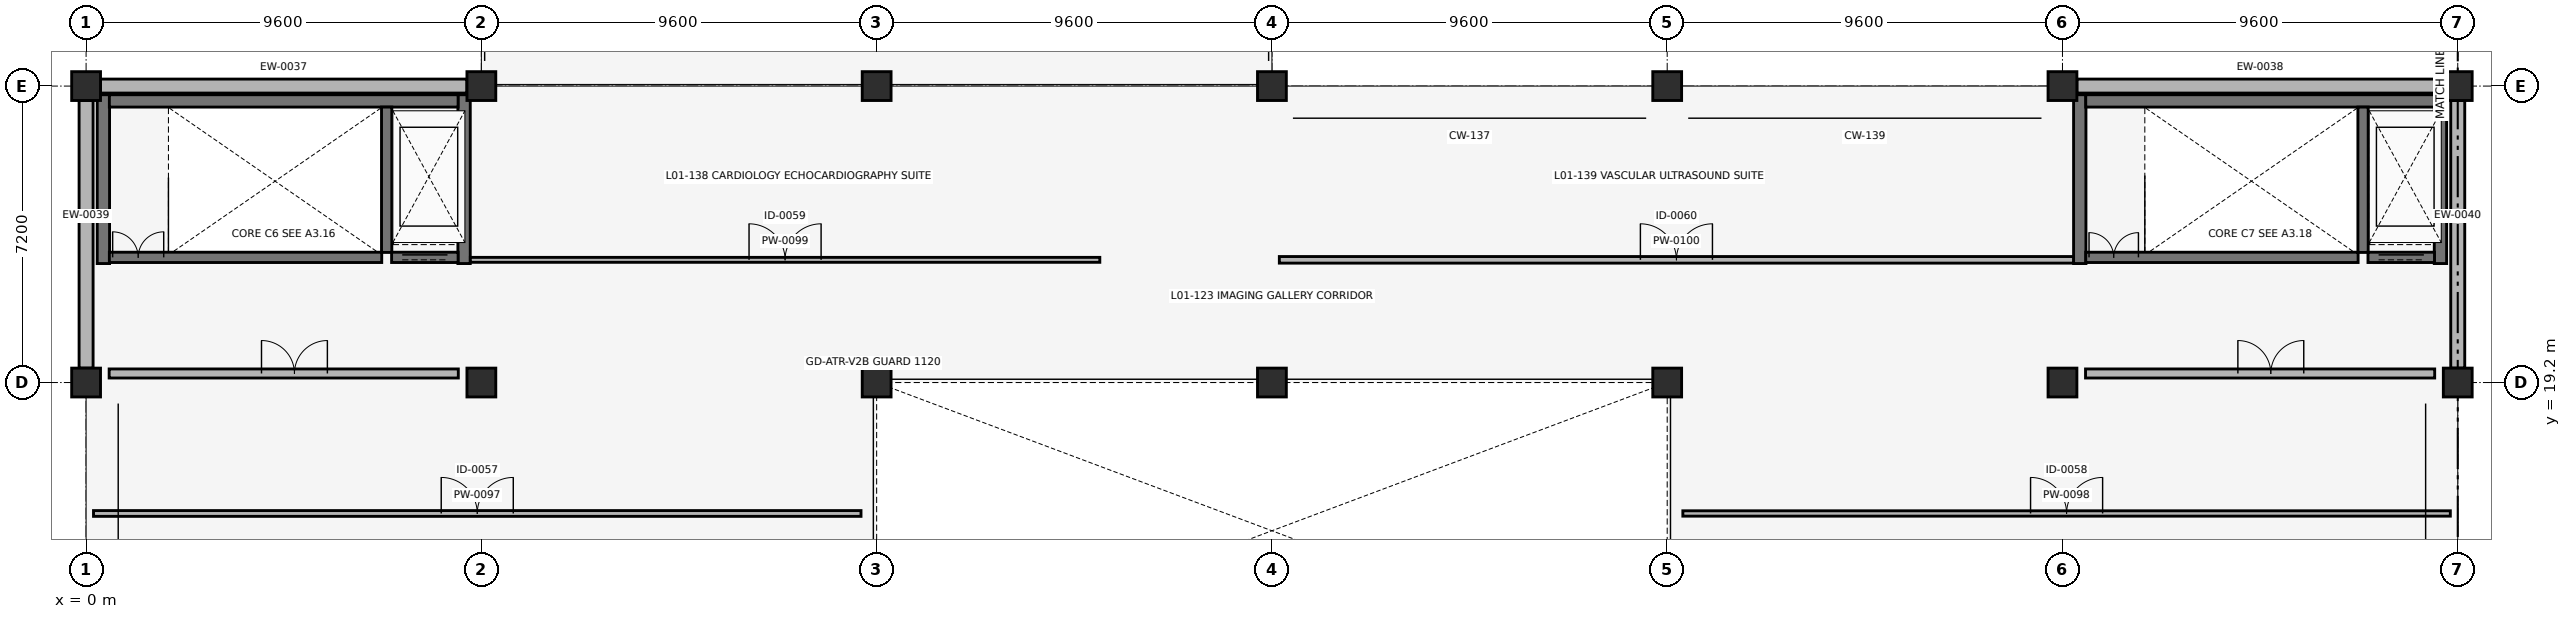
"""IFC4 building model, lengths in metres.
Left out: names, types, materials, properties, quantities, classifications, styles, units other than length and angle.
Written with IfcOpenShell. Run it as: python <this file> out.ifc"""

import sys

from ifc_helpers import new_model, si_unit, direction, frame, frame_2d, origin, origin_2d, place, context, subcontext, project, spatial, rectangle, circle, extrude, element, fill, save


model = new_model("IFC4")
c1 = context("Model", 3, precision=1e-05, world=origin(), true_north=direction((0.0, 1.0)))
c2 = subcontext(c1, "Body", "Model", "MODEL_VIEW")
j1 = project(units=[si_unit("LENGTHUNIT", "METRE"), si_unit("PLANEANGLEUNIT", "RADIAN")], contexts=[c1])
p1 = place(None, origin())
s1 = spatial("IfcSite", under=j1, at=p1, CompositionType="ELEMENT")
p2 = place(p1, origin())
s2 = spatial("IfcBuilding", under=s1, at=p2, CompositionType="ELEMENT")
p3 = place(p2, frame((0.0, 0.0, 4.42)))
s3 = spatial("IfcBuildingStorey", under=s2, at=p3, CompositionType="ELEMENT", Elevation=4.42)
for number, where, z_axis, x_axis in (
    (1, (0.0, 19.2, 0.0), (0.0, 0.0, 1.0), (1.0, 0.0, 0.0)),
    (2, (0.0, 26.4, 0.0), (0.0, 0.0, 1.0), (1.0, 0.0, 0.0)),
    (3, (9.6, 19.2, 0.0), (0.0, 0.0, 1.0), (1.0, 0.0, 0.0)),
    (4, (9.6, 26.4, 0.0), (0.0, 0.0, 1.0), (1.0, 0.0, 0.0)),
    (5, (19.2, 19.2, 0.0), (0.0, 0.0, 1.0), (1.0, 0.0, 0.0)),
    (6, (19.2, 26.4, 0.0), (0.0, 0.0, 1.0), (1.0, 0.0, 0.0)),
    (7, (28.8, 19.2, 0.0), (0.0, 0.0, 1.0), (1.0, 0.0, 0.0)),
    (8, (28.8, 26.4, 0.0), (0.0, 0.0, 1.0), (1.0, 0.0, 0.0)),
    (9, (38.4, 19.2, 0.0), (0.0, 0.0, 1.0), (1.0, 0.0, 0.0)),
    (10, (38.4, 26.4, 0.0), (0.0, 0.0, 1.0), (1.0, 0.0, 0.0)),
    (11, (48.0, 19.2, 0.0), (0.0, 0.0, 1.0), (1.0, 0.0, 0.0)),
    (12, (48.0, 26.4, 0.0), (0.0, 0.0, 1.0), (1.0, 0.0, 0.0)),
    (13, (57.6, 19.2, 0.0), (0.0, 0.0, 1.0), (1.0, 0.0, 0.0)),
    (14, (57.6, 26.4, 0.0), (0.0, 0.0, 1.0), (1.0, 0.0, 0.0)),
):
    element("IfcColumn", number, at=place(p3, frame(where, z_axis=z_axis, x_axis=x_axis)), inside=s3, PredefinedType="COLUMN", context=c2, shape_type="SweptSolid", body=[
        extrude(circle(Radius=0.35, at=origin_2d()), origin(), (0.0, 0.0, 1.0), 4.08),
    ])
for number, where, z_axis, x_axis in (
    (15, (9.25, 26.4, 0.0), (0.0, 0.0, 1.0), (-1.0, 0.0, 0.0)),
    (16, (57.25, 26.4, 0.0), (0.0, 0.0, 1.0), (-1.0, 0.0, 0.0)),
):
    element("IfcWall", number, at=place(p3, frame(where, z_axis=z_axis, x_axis=x_axis)), inside=s3, PredefinedType="SOLIDWALL", context=c2, shape_type="SweptSolid", body=[
        extrude(rectangle(XDim=8.9, YDim=0.34, at=frame_2d((4.45, 0.0))), origin(), (0.0, 0.0, 1.0), 3.01),
    ])
for number, where, z_axis, x_axis in (
    (17, (0.0, 26.05, 0.0), (0.0, 0.0, 1.0), (0.0, -1.0, 0.0)),
    (18, (57.6, 19.55, 0.0), (0.0, 0.0, 1.0), (0.0, 1.0, 0.0)),
):
    element("IfcWall", number, at=place(p3, frame(where, z_axis=z_axis, x_axis=x_axis)), inside=s3, PredefinedType="SOLIDWALL", context=c2, shape_type="SweptSolid", body=[
        extrude(rectangle(XDim=6.5, YDim=0.34, at=frame_2d((3.25, 0.0))), origin(), (0.0, 0.0, 1.0), 3.01),
    ])
for number, where, z_axis, x_axis in (
    (19, (0.42, 22.09, 0.0), (0.0, 0.0, 1.0), (0.0, 1.0, 0.0)),
    (20, (9.18, 22.09, 0.0), (0.0, 0.0, 1.0), (0.0, 1.0, 0.0)),
):
    element("IfcWall", number, at=place(p3, frame(where, z_axis=z_axis, x_axis=x_axis)), inside=s3, PredefinedType="SHEAR", context=c2, shape_type="SweptSolid", body=[
        extrude(rectangle(XDim=4.1, YDim=0.3, at=frame_2d((2.05, 0.0))), origin(), (0.0, 0.0, 1.0), 3.74),
    ])
p4 = place(p3, frame((0.565, 26.04, 0.0), z_axis=(0.0, 0.0, 1.0), x_axis=(1.0, 0.0, 0.0)))
e21 = element("IfcWall", 21, at=p4, inside=s3, PredefinedType="SHEAR", context=c2, shape_type="SweptSolid", body=[
    extrude(rectangle(XDim=8.47, YDim=0.3, at=frame_2d((4.235, 0.0))), origin(), (0.0, 0.0, 1.0), 3.74),
])
p5 = place(p3, frame((7.3, 22.36, 0.0), z_axis=(0.0, 0.0, 1.0), x_axis=(0.0, 1.0, 0.0)))
e22 = element("IfcWall", 22, at=p5, inside=s3, PredefinedType="SHEAR", context=c2, shape_type="SweptSolid", body=[
    extrude(rectangle(XDim=3.53, YDim=0.25, at=frame_2d((1.765, 0.0))), origin(), (0.0, 0.0, 1.0), 3.74),
])
p6 = place(p3, frame((0.565, 22.24, 0.0), z_axis=(0.0, 0.0, 1.0), x_axis=(1.0, 0.0, 0.0)))
e23 = element("IfcWall", 23, at=p6, inside=s3, PredefinedType="SHEAR", context=c2, shape_type="SweptSolid", body=[
    extrude(rectangle(XDim=6.615, YDim=0.25, at=frame_2d((3.308, 0.0))), origin(), (0.0, 0.0, 1.0), 3.74),
])
p7 = place(p6, frame((0.08, 0.0, 0.0)))
e24 = element("IfcOpeningElement", 24, at=p7, cuts=e23, PredefinedType="OPENING", context=c2, shape_type="SweptSolid", body=[
    extrude(rectangle(XDim=1.24, YDim=2.15, at=frame_2d((0.62, 1.075))), frame((0.0, 0.135, 0.0), z_axis=(0.0, -1.0, 0.0), x_axis=(1.0, 0.0, 0.0)), (0.0, 0.0, 1.0), 0.27),
])
p8 = place(p3, frame((0.56, 19.42, 0.0), z_axis=(0.0, 0.0, 1.0), x_axis=(1.0, 0.0, 0.0)))
e25 = element("IfcWall", 25, at=p8, inside=s3, PredefinedType="PARTITIONING", context=c2, shape_type="SweptSolid", body=[
    extrude(rectangle(XDim=8.48, YDim=0.22, at=frame_2d((4.24, 0.0))), origin(), (0.0, 0.0, 1.0), 3.05),
])
p9 = place(p8, frame((3.7, 0.0, 0.0)))
e26 = element("IfcOpeningElement", 26, at=p9, cuts=e25, PredefinedType="OPENING", context=c2, shape_type="SweptSolid", body=[
    extrude(rectangle(XDim=1.6, YDim=2.2, at=frame_2d((0.8, 1.1))), frame((0.0, 0.12, 0.0), z_axis=(0.0, -1.0, 0.0), x_axis=(1.0, 0.0, 0.0)), (0.0, 0.0, 1.0), 0.24),
])
p10 = place(p3, frame((7.42, 22.24, 0.0), z_axis=(0.0, 0.0, 1.0), x_axis=(1.0, 0.0, 0.0)))
e27 = element("IfcWall", 27, at=p10, inside=s3, PredefinedType="SHEAR", context=c2, shape_type="SweptSolid", body=[
    extrude(rectangle(XDim=1.615, YDim=0.25, at=frame_2d((0.808, 0.0))), origin(), (0.0, 0.0, 1.0), 3.74),
])
p11 = place(p10, frame((0.258, 0.0, 0.0)))
e28 = element("IfcOpeningElement", 28, at=p11, cuts=e27, PredefinedType="OPENING", context=c2, shape_type="SweptSolid", body=[
    extrude(rectangle(XDim=1.1, YDim=2.15, at=frame_2d((0.55, 1.075))), frame((0.0, 0.135, 0.0), z_axis=(0.0, -1.0, 0.0), x_axis=(1.0, 0.0, 0.0)), (0.0, 0.0, 1.0), 0.27),
])
for number, where, z_axis, x_axis in (
    (29, (48.42, 22.09, 0.0), (0.0, 0.0, 1.0), (0.0, 1.0, 0.0)),
    (30, (57.18, 22.09, 0.0), (0.0, 0.0, 1.0), (0.0, 1.0, 0.0)),
):
    element("IfcWall", number, at=place(p3, frame(where, z_axis=z_axis, x_axis=x_axis)), inside=s3, PredefinedType="SHEAR", context=c2, shape_type="SweptSolid", body=[
        extrude(rectangle(XDim=4.1, YDim=0.3, at=frame_2d((2.05, 0.0))), origin(), (0.0, 0.0, 1.0), 3.74),
    ])
p12 = place(p3, frame((48.565, 26.04, 0.0), z_axis=(0.0, 0.0, 1.0), x_axis=(1.0, 0.0, 0.0)))
e31 = element("IfcWall", 31, at=p12, inside=s3, PredefinedType="SHEAR", context=c2, shape_type="SweptSolid", body=[
    extrude(rectangle(XDim=8.47, YDim=0.3, at=frame_2d((4.235, 0.0))), origin(), (0.0, 0.0, 1.0), 3.74),
])
p13 = place(p3, frame((55.3, 22.36, 0.0), z_axis=(0.0, 0.0, 1.0), x_axis=(0.0, 1.0, 0.0)))
e32 = element("IfcWall", 32, at=p13, inside=s3, PredefinedType="SHEAR", context=c2, shape_type="SweptSolid", body=[
    extrude(rectangle(XDim=3.53, YDim=0.25, at=frame_2d((1.765, 0.0))), origin(), (0.0, 0.0, 1.0), 3.74),
])
p14 = place(p3, frame((48.565, 22.24, 0.0), z_axis=(0.0, 0.0, 1.0), x_axis=(1.0, 0.0, 0.0)))
e33 = element("IfcWall", 33, at=p14, inside=s3, PredefinedType="SHEAR", context=c2, shape_type="SweptSolid", body=[
    extrude(rectangle(XDim=6.615, YDim=0.25, at=frame_2d((3.308, 0.0))), origin(), (0.0, 0.0, 1.0), 3.74),
])
p15 = place(p14, frame((0.08, 0.0, 0.0)))
e34 = element("IfcOpeningElement", 34, at=p15, cuts=e33, PredefinedType="OPENING", context=c2, shape_type="SweptSolid", body=[
    extrude(rectangle(XDim=1.2, YDim=2.15, at=frame_2d((0.6, 1.075))), frame((0.0, 0.135, 0.0), z_axis=(0.0, -1.0, 0.0), x_axis=(1.0, 0.0, 0.0)), (0.0, 0.0, 1.0), 0.27),
])
p16 = place(p3, frame((48.56, 19.42, 0.0), z_axis=(0.0, 0.0, 1.0), x_axis=(1.0, 0.0, 0.0)))
e35 = element("IfcWall", 35, at=p16, inside=s3, PredefinedType="PARTITIONING", context=c2, shape_type="SweptSolid", body=[
    extrude(rectangle(XDim=8.48, YDim=0.22, at=frame_2d((4.24, 0.0))), origin(), (0.0, 0.0, 1.0), 3.05),
])
p17 = place(p16, frame((3.7, 0.0, 0.0)))
e36 = element("IfcOpeningElement", 36, at=p17, cuts=e35, PredefinedType="OPENING", context=c2, shape_type="SweptSolid", body=[
    extrude(rectangle(XDim=1.6, YDim=2.2, at=frame_2d((0.8, 1.1))), frame((0.0, 0.12, 0.0), z_axis=(0.0, -1.0, 0.0), x_axis=(1.0, 0.0, 0.0)), (0.0, 0.0, 1.0), 0.24),
])
p18 = place(p3, frame((55.42, 22.24, 0.0), z_axis=(0.0, 0.0, 1.0), x_axis=(1.0, 0.0, 0.0)))
e37 = element("IfcWall", 37, at=p18, inside=s3, PredefinedType="SHEAR", context=c2, shape_type="SweptSolid", body=[
    extrude(rectangle(XDim=1.615, YDim=0.25, at=frame_2d((0.808, 0.0))), origin(), (0.0, 0.0, 1.0), 3.74),
])
p19 = place(p18, frame((0.258, 0.0, 0.0)))
e38 = element("IfcOpeningElement", 38, at=p19, cuts=e37, PredefinedType="OPENING", context=c2, shape_type="SweptSolid", body=[
    extrude(rectangle(XDim=1.1, YDim=2.15, at=frame_2d((0.55, 1.075))), frame((0.0, 0.135, 0.0), z_axis=(0.0, -1.0, 0.0), x_axis=(1.0, 0.0, 0.0)), (0.0, 0.0, 1.0), 0.27),
])
p20 = place(p3, frame((0.18, 16.02, 0.0), z_axis=(0.0, 0.0, 1.0), x_axis=(1.0, 0.0, 0.0)))
e39 = element("IfcWall", 39, at=p20, inside=s3, PredefinedType="PARTITIONING", context=c2, shape_type="SweptSolid", body=[
    extrude(rectangle(XDim=18.64, YDim=0.14, at=frame_2d((9.32, 0.0))), origin(), (0.0, 0.0, 1.0), 3.05),
])
p21 = place(p20, frame((8.445, 0.0, 0.0)))
e40 = element("IfcOpeningElement", 40, at=p21, cuts=e39, PredefinedType="OPENING", context=c2, shape_type="SweptSolid", body=[
    extrude(rectangle(XDim=1.75, YDim=2.15, at=frame_2d((0.875, 1.075))), frame((0.0, 0.08, 0.0), z_axis=(0.0, -1.0, 0.0), x_axis=(1.0, 0.0, 0.0)), (0.0, 0.0, 1.0), 0.16),
])
p22 = place(p3, frame((38.78, 16.02, 0.0), z_axis=(0.0, 0.0, 1.0), x_axis=(1.0, 0.0, 0.0)))
e41 = element("IfcWall", 41, at=p22, inside=s3, PredefinedType="PARTITIONING", context=c2, shape_type="SweptSolid", body=[
    extrude(rectangle(XDim=18.64, YDim=0.13, at=frame_2d((9.32, 0.0))), origin(), (0.0, 0.0, 1.0), 3.05),
])
p23 = place(p22, frame((8.445, 0.0, 0.0)))
e42 = element("IfcOpeningElement", 42, at=p23, cuts=e41, PredefinedType="OPENING", context=c2, shape_type="SweptSolid", body=[
    extrude(rectangle(XDim=1.75, YDim=2.15, at=frame_2d((0.875, 1.075))), frame((0.0, 0.075, 0.0), z_axis=(0.0, -1.0, 0.0), x_axis=(1.0, 0.0, 0.0)), (0.0, 0.0, 1.0), 0.15),
])
p24 = place(p3, frame((9.332, 22.18, 0.0), z_axis=(0.0, 0.0, 1.0), x_axis=(1.0, 0.0, 0.0)))
e43 = element("IfcWall", 43, at=p24, inside=s3, PredefinedType="PARTITIONING", context=c2, shape_type="SweptSolid", body=[
    extrude(rectangle(XDim=15.288, YDim=0.12, at=frame_2d((7.644, 0.0))), origin(), (0.0, 0.0, 1.0), 3.1),
])
p25 = place(p24, frame((6.769, 0.0, 0.0)))
e44 = element("IfcOpeningElement", 44, at=p25, cuts=e43, PredefinedType="OPENING", context=c2, shape_type="SweptSolid", body=[
    extrude(rectangle(XDim=1.75, YDim=2.15, at=frame_2d((0.875, 1.075))), frame((0.0, 0.07, 0.0), z_axis=(0.0, -1.0, 0.0), x_axis=(1.0, 0.0, 0.0)), (0.0, 0.0, 1.0), 0.14),
])
p26 = place(p3, frame((28.98, 22.18, 0.0), z_axis=(0.0, 0.0, 1.0), x_axis=(1.0, 0.0, 0.0)))
e45 = element("IfcWall", 45, at=p26, inside=s3, PredefinedType="PARTITIONING", context=c2, shape_type="SweptSolid", body=[
    extrude(rectangle(XDim=19.288, YDim=0.16, at=frame_2d((9.644, 0.0))), origin(), (0.0, 0.0, 1.0), 3.1),
])
p27 = place(p26, frame((8.769, 0.0, 0.0)))
e46 = element("IfcOpeningElement", 46, at=p27, cuts=e45, PredefinedType="OPENING", context=c2, shape_type="SweptSolid", body=[
    extrude(rectangle(XDim=1.75, YDim=2.15, at=frame_2d((0.875, 1.075))), frame((0.0, 0.09, 0.0), z_axis=(0.0, -1.0, 0.0), x_axis=(1.0, 0.0, 0.0)), (0.0, 0.0, 1.0), 0.18),
])
p28 = place(p7, origin())
e47 = element("IfcDoor", 47, at=p28, inside=s3, OperationType="DOUBLE_DOOR_SINGLE_SWING", PredefinedType="DOOR", context=c2, shape_type="SweptSolid", body=[
    extrude(rectangle(XDim=1.24, YDim=2.15, at=frame_2d((0.62, 1.075))), frame((0.0, 0.025, 0.0), z_axis=(0.0, -1.0, 0.0), x_axis=(1.0, 0.0, 0.0)), (0.0, 0.0, 1.0), 0.05),
])
fill(e24, e47)
p29 = place(p9, origin())
e48 = element("IfcDoor", 48, at=p29, inside=s3, OperationType="DOUBLE_DOOR_SINGLE_SWING", PredefinedType="DOOR", context=c2, shape_type="SweptSolid", body=[
    extrude(rectangle(XDim=1.6, YDim=2.2, at=frame_2d((0.8, 1.1))), frame((0.0, 0.025, 0.0), z_axis=(0.0, -1.0, 0.0), x_axis=(1.0, 0.0, 0.0)), (0.0, 0.0, 1.0), 0.05),
])
fill(e26, e48)
p30 = place(p11, origin())
e49 = element("IfcDoor", 49, at=p30, inside=s3, OperationType="DOUBLE_DOOR_SLIDING", PredefinedType="DOOR", context=c2, shape_type="SweptSolid", body=[
    extrude(rectangle(XDim=1.1, YDim=2.15, at=frame_2d((0.55, 1.075))), frame((0.0, 0.025, 0.0), z_axis=(0.0, -1.0, 0.0), x_axis=(1.0, 0.0, 0.0)), (0.0, 0.0, 1.0), 0.05),
])
fill(e28, e49)
p31 = place(p15, origin())
e50 = element("IfcDoor", 50, at=p31, inside=s3, OperationType="DOUBLE_DOOR_SINGLE_SWING", PredefinedType="DOOR", context=c2, shape_type="SweptSolid", body=[
    extrude(rectangle(XDim=1.2, YDim=2.15, at=frame_2d((0.6, 1.075))), frame((0.0, 0.025, 0.0), z_axis=(0.0, -1.0, 0.0), x_axis=(1.0, 0.0, 0.0)), (0.0, 0.0, 1.0), 0.05),
])
fill(e34, e50)
p32 = place(p17, origin())
e51 = element("IfcDoor", 51, at=p32, inside=s3, OperationType="DOUBLE_DOOR_SINGLE_SWING", PredefinedType="DOOR", context=c2, shape_type="SweptSolid", body=[
    extrude(rectangle(XDim=1.6, YDim=2.2, at=frame_2d((0.8, 1.1))), frame((0.0, 0.025, 0.0), z_axis=(0.0, -1.0, 0.0), x_axis=(1.0, 0.0, 0.0)), (0.0, 0.0, 1.0), 0.05),
])
fill(e36, e51)
p33 = place(p19, origin())
e52 = element("IfcDoor", 52, at=p33, inside=s3, OperationType="DOUBLE_DOOR_SLIDING", PredefinedType="DOOR", context=c2, shape_type="SweptSolid", body=[
    extrude(rectangle(XDim=1.1, YDim=2.15, at=frame_2d((0.55, 1.075))), frame((0.0, 0.025, 0.0), z_axis=(0.0, -1.0, 0.0), x_axis=(1.0, 0.0, 0.0)), (0.0, 0.0, 1.0), 0.05),
])
fill(e38, e52)
p34 = place(p21, origin())
e53 = element("IfcDoor", 53, at=p34, inside=s3, OperationType="DOUBLE_DOOR_SINGLE_SWING", PredefinedType="DOOR", context=c2, shape_type="SweptSolid", body=[
    extrude(rectangle(XDim=1.75, YDim=2.15, at=frame_2d((0.875, 1.075))), frame((0.0, 0.025, 0.0), z_axis=(0.0, -1.0, 0.0), x_axis=(1.0, 0.0, 0.0)), (0.0, 0.0, 1.0), 0.05),
])
fill(e40, e53)
p35 = place(p23, origin())
e54 = element("IfcDoor", 54, at=p35, inside=s3, OperationType="DOUBLE_DOOR_SINGLE_SWING", PredefinedType="DOOR", context=c2, shape_type="SweptSolid", body=[
    extrude(rectangle(XDim=1.75, YDim=2.15, at=frame_2d((0.875, 1.075))), frame((0.0, 0.025, 0.0), z_axis=(0.0, -1.0, 0.0), x_axis=(1.0, 0.0, 0.0)), (0.0, 0.0, 1.0), 0.05),
])
fill(e42, e54)
p36 = place(p25, origin())
e55 = element("IfcDoor", 55, at=p36, inside=s3, OperationType="DOUBLE_DOOR_SINGLE_SWING", PredefinedType="DOOR", context=c2, shape_type="SweptSolid", body=[
    extrude(rectangle(XDim=1.75, YDim=2.15, at=frame_2d((0.875, 1.075))), frame((0.0, 0.025, 0.0), z_axis=(0.0, -1.0, 0.0), x_axis=(1.0, 0.0, 0.0)), (0.0, 0.0, 1.0), 0.05),
])
fill(e44, e55)
p37 = place(p27, origin())
e56 = element("IfcDoor", 56, at=p37, inside=s3, OperationType="DOUBLE_DOOR_SINGLE_SWING", PredefinedType="DOOR", context=c2, shape_type="SweptSolid", body=[
    extrude(rectangle(XDim=1.75, YDim=2.15, at=frame_2d((0.875, 1.075))), frame((0.0, 0.025, 0.0), z_axis=(0.0, -1.0, 0.0), x_axis=(1.0, 0.0, 0.0)), (0.0, 0.0, 1.0), 0.05),
])
fill(e46, e56)
save(model, sys.argv[1])
